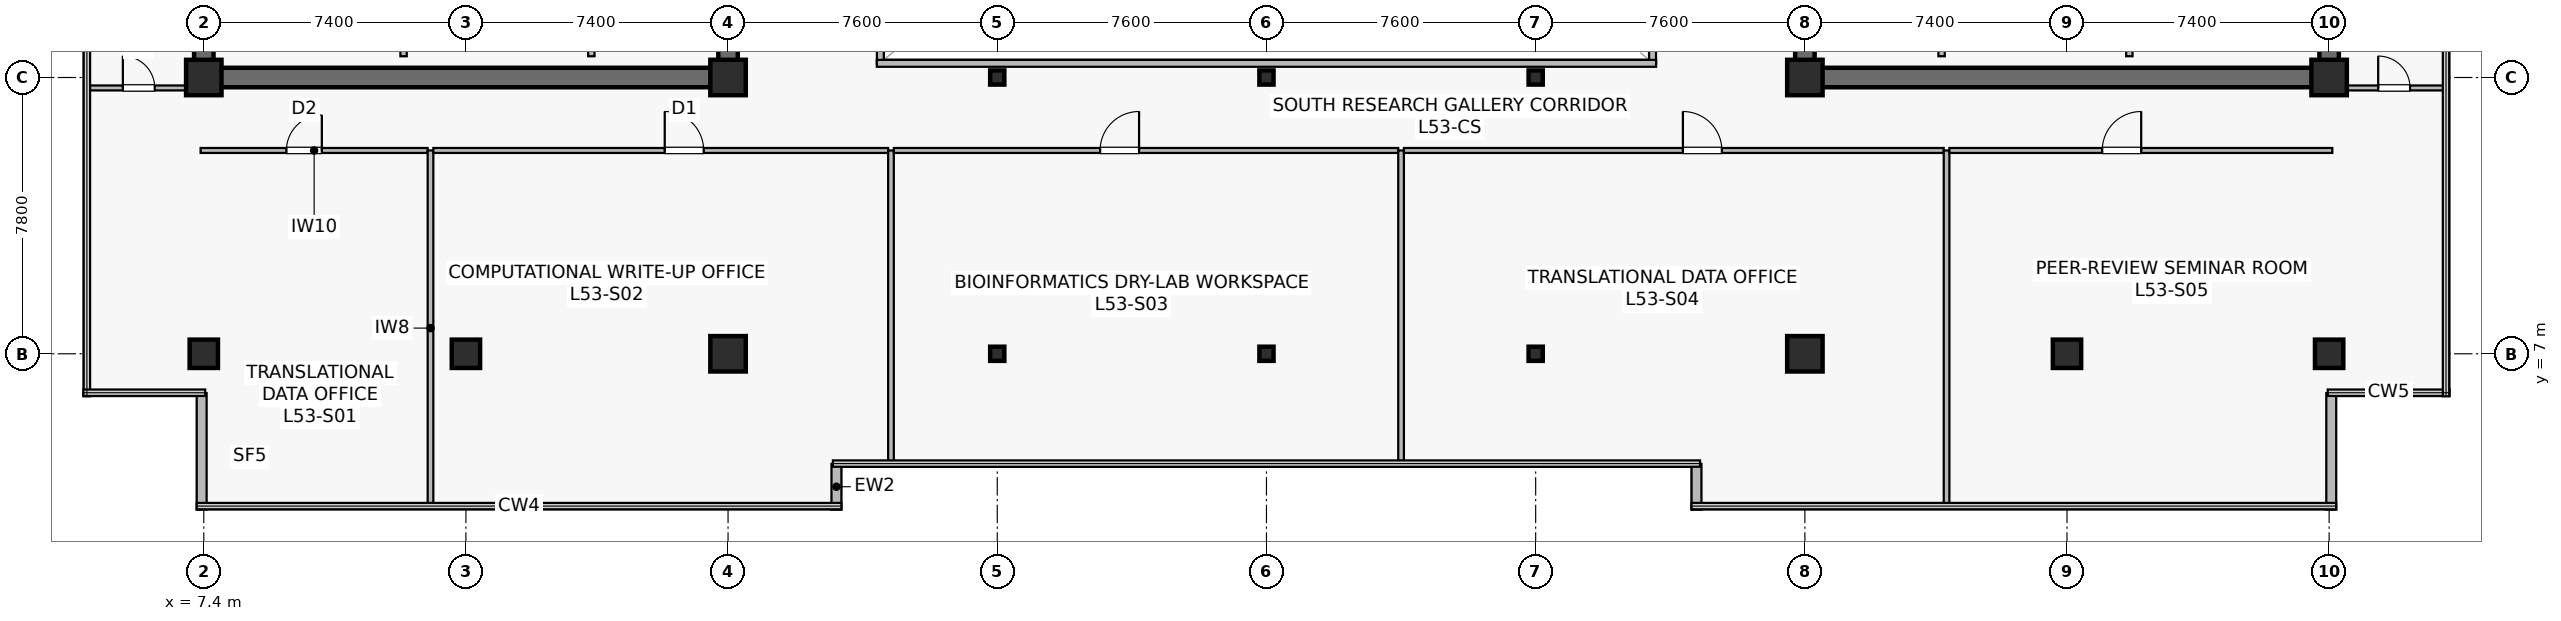
"""IFC4 building model, lengths in metres.
Left out: names, types, materials, properties, quantities, classifications, styles, units other than length and angle.
Written with IfcOpenShell. Run it as: python <this file> out.ifc"""

import sys

from ifc_helpers import new_model, si_unit, direction, frame, frame_2d, origin, origin_2d, place, context, subcontext, project, spatial, rectangle, hollow_rectangle, extrude, source, transform, mapped, element, fill, save


model = new_model("IFC4")
c1 = context("Model", 3, precision=1e-05, world=origin(), true_north=direction((0.0, 1.0)))
c2 = subcontext(c1, "Body", "Model", "MODEL_VIEW")
j1 = project(units=[si_unit("LENGTHUNIT", "METRE"), si_unit("PLANEANGLEUNIT", "RADIAN")], contexts=[c1])
p1 = place(None, origin())
s1 = spatial("IfcSite", under=j1, at=p1, CompositionType="ELEMENT")
p2 = place(p1, origin())
s2 = spatial("IfcBuilding", under=s1, at=p2, CompositionType="ELEMENT")
p3 = place(p2, frame((0.0, 0.0, 221.9)))
s3 = spatial("IfcBuildingStorey", under=s2, at=p3, CompositionType="ELEMENT", Elevation=221.9)
p4 = place(p3, frame((7.125, 14.8, 0.0), z_axis=(0.0, 0.0, 1.0), x_axis=(1.0, 0.0, 0.0)))
e1 = element("IfcWall", 1, at=p4, inside=s3, PredefinedType="SHEAR", context=c2, shape_type="SweptSolid", body=[
    extrude(rectangle(XDim=15.35, YDim=0.55, at=frame_2d((7.675, 0.0))), origin(), (0.0, 0.0, 1.0), 3.8),
])
p5 = place(p3, frame((7.4, 15.075, 0.0), z_axis=(0.0, 0.0, 1.0), x_axis=(0.0, 1.0, 0.0)))
e2 = element("IfcWall", 2, at=p5, inside=s3, PredefinedType="SHEAR", context=c2, shape_type="SweptSolid", body=[
    extrude(rectangle(XDim=18.45, YDim=0.55, at=frame_2d((9.225, 0.0))), origin(), (0.0, 0.0, 1.0), 3.8),
])
p6 = place(p3, frame((22.2, 15.075, 0.0), z_axis=(0.0, 0.0, 1.0), x_axis=(0.0, 1.0, 0.0)))
e3 = element("IfcWall", 3, at=p6, inside=s3, PredefinedType="SHEAR", context=c2, shape_type="SweptSolid", body=[
    extrude(rectangle(XDim=18.45, YDim=0.55, at=frame_2d((9.225, 0.0))), origin(), (0.0, 0.0, 1.0), 3.8),
])
p7 = place(p6, frame((3.475, 0.0, 0.0)))
e4 = element("IfcOpeningElement", 4, at=p7, cuts=e3, PredefinedType="OPENING", context=c2, shape_type="SweptSolid", body=[
    extrude(rectangle(XDim=1.42, YDim=2.2, at=frame_2d((0.71, 1.1))), frame((0.0, 0.285, 0.0), z_axis=(0.0, -1.0, 0.0), x_axis=(1.0, 0.0, 0.0)), (0.0, 0.0, 1.0), 0.57),
])
p8 = place(p3, frame((52.325, 14.8, 0.0), z_axis=(0.0, 0.0, 1.0), x_axis=(1.0, 0.0, 0.0)))
e5 = element("IfcWall", 5, at=p8, inside=s3, PredefinedType="SHEAR", context=c2, shape_type="SweptSolid", body=[
    extrude(rectangle(XDim=15.35, YDim=0.55, at=frame_2d((7.675, 0.0))), origin(), (0.0, 0.0, 1.0), 3.8),
])
p9 = place(p3, frame((52.6, 15.075, 0.0), z_axis=(0.0, 0.0, 1.0), x_axis=(0.0, 1.0, 0.0)))
e6 = element("IfcWall", 6, at=p9, inside=s3, PredefinedType="SHEAR", context=c2, shape_type="SweptSolid", body=[
    extrude(rectangle(XDim=18.45, YDim=0.55, at=frame_2d((9.225, 0.0))), origin(), (0.0, 0.0, 1.0), 3.8),
])
p10 = place(p9, frame((3.475, 0.0, 0.0)))
e7 = element("IfcOpeningElement", 7, at=p10, cuts=e6, PredefinedType="OPENING", context=c2, shape_type="SweptSolid", body=[
    extrude(rectangle(XDim=1.42, YDim=2.2, at=frame_2d((0.71, 1.1))), frame((0.0, 0.285, 0.0), z_axis=(0.0, -1.0, 0.0), x_axis=(1.0, 0.0, 0.0)), (0.0, 0.0, 1.0), 0.57),
])
p11 = place(p3, frame((67.4, 15.075, 0.0), z_axis=(0.0, 0.0, 1.0), x_axis=(0.0, 1.0, 0.0)))
e8 = element("IfcWall", 8, at=p11, inside=s3, PredefinedType="SHEAR", context=c2, shape_type="SweptSolid", body=[
    extrude(rectangle(XDim=18.45, YDim=0.55, at=frame_2d((9.225, 0.0))), origin(), (0.0, 0.0, 1.0), 3.8),
])
m1 = source(origin(), c2, "Body", "SweptSolid", [
    extrude(rectangle(XDim=0.8, YDim=0.8, at=origin_2d()), origin(), (0.0, 0.0, 1.0), 4.1),
])
p12 = place(p3, frame((14.8, 7.0, 0.0), z_axis=(0.0, 0.0, 1.0), x_axis=(1.0, 0.0, 0.0)))
e9 = element("IfcColumn", 9, at=p12, inside=s3, PredefinedType="COLUMN", context=c2, shape_type="MappedRepresentation", body=[
    mapped(m1, transform((0.0, 0.0, 0.0), scale=1.0)),
])
m2 = source(origin(), c2, "Body", "SweptSolid", [
    extrude(rectangle(XDim=1.0, YDim=1.0, at=origin_2d()), origin(), (0.0, 0.0, 1.0), 4.1),
])
for number, where, z_axis, x_axis in (
    (10, (22.2, 7.0, 0.0), (0.0, 0.0, 1.0), (1.0, 0.0, 0.0)),
    (11, (7.4, 14.8, 0.0), (0.0, 0.0, 1.0), (1.0, 0.0, 0.0)),
    (12, (22.2, 14.8, 0.0), (0.0, 0.0, 1.0), (1.0, 0.0, 0.0)),
    (13, (52.6, 7.0, 0.0), (0.0, 0.0, 1.0), (1.0, 0.0, 0.0)),
):
    element("IfcColumn", number, at=place(p3, frame(where, z_axis=z_axis, x_axis=x_axis)), inside=s3, PredefinedType="COLUMN", context=c2, shape_type="MappedRepresentation", body=[
        mapped(m2, transform((0.0, 0.0, 0.0), scale=1.0)),
    ])
p13 = place(p3, frame((60.0, 7.0, 0.0), z_axis=(0.0, 0.0, 1.0), x_axis=(1.0, 0.0, 0.0)))
e14 = element("IfcColumn", 14, at=p13, inside=s3, PredefinedType="COLUMN", context=c2, shape_type="MappedRepresentation", body=[
    mapped(m1, transform((0.0, 0.0, 0.0), scale=1.0)),
])
for number, where, z_axis, x_axis in (
    (15, (52.6, 14.8, 0.0), (0.0, 0.0, 1.0), (1.0, 0.0, 0.0)),
    (16, (67.4, 14.8, 0.0), (0.0, 0.0, 1.0), (1.0, 0.0, 0.0)),
):
    element("IfcColumn", number, at=place(p3, frame(where, z_axis=z_axis, x_axis=x_axis)), inside=s3, PredefinedType="COLUMN", context=c2, shape_type="MappedRepresentation", body=[
        mapped(m2, transform((0.0, 0.0, 0.0), scale=1.0)),
    ])
for number, where, z_axis, x_axis in (
    (17, (7.4, 7.0, 0.0), (0.0, 0.0, 1.0), (1.0, 0.0, 0.0)),
    (18, (67.4, 7.0, 0.0), (0.0, 0.0, 1.0), (1.0, 0.0, 0.0)),
):
    element("IfcColumn", number, at=place(p3, frame(where, z_axis=z_axis, x_axis=x_axis)), inside=s3, PredefinedType="COLUMN", context=c2, shape_type="MappedRepresentation", body=[
        mapped(m1, transform((0.0, 0.0, 0.0), scale=1.0)),
    ])
m3 = source(origin(), c2, "Body", "SweptSolid", [
    extrude(hollow_rectangle(XDim=0.4, YDim=0.4, WallThickness=0.019, at=origin_2d()), origin(), (0.0, 0.0, 1.0), 4.1),
])
for number, where, z_axis, x_axis in (
    (19, (29.8, 7.0, 0.0), (0.0, 0.0, 1.0), (1.0, 0.0, 0.0)),
    (20, (29.8, 14.8, 0.0), (0.0, 0.0, 1.0), (1.0, 0.0, 0.0)),
    (21, (37.4, 7.0, 0.0), (0.0, 0.0, 1.0), (1.0, 0.0, 0.0)),
    (22, (37.4, 14.8, 0.0), (0.0, 0.0, 1.0), (1.0, 0.0, 0.0)),
    (23, (45.0, 7.0, 0.0), (0.0, 0.0, 1.0), (1.0, 0.0, 0.0)),
    (24, (45.0, 14.8, 0.0), (0.0, 0.0, 1.0), (1.0, 0.0, 0.0)),
):
    element("IfcColumn", number, at=place(p3, frame(where, z_axis=z_axis, x_axis=x_axis)), inside=s3, PredefinedType="COLUMN", context=c2, shape_type="MappedRepresentation", body=[
        mapped(m3, transform((0.0, 0.0, 0.0), scale=1.0)),
    ])
for number, where, z_axis, x_axis in (
    (25, (25.26, 2.6, 0.0), (0.0, 0.0, 1.0), (0.0, 1.0, 0.0)),
    (26, (49.54, 3.893, 0.0), (0.0, 0.0, 1.0), (0.0, -1.0, 0.0)),
):
    element("IfcWall", number, at=place(p3, frame(where, z_axis=z_axis, x_axis=x_axis)), inside=s3, PredefinedType="STANDARD", context=c2, shape_type="SweptSolid", body=[
        extrude(rectangle(XDim=1.293, YDim=0.28, at=frame_2d((0.646, 0.0))), origin(), (0.0, 0.0, 1.0), 3.8),
    ])
for number, where, z_axis, x_axis in (
    (27, (67.46, 2.6, 0.0), (0.0, 0.0, 1.0), (0.0, 1.0, 0.0)),
    (28, (7.34, 5.888, 0.0), (0.0, 0.0, 1.0), (0.0, -1.0, 0.0)),
):
    element("IfcWall", number, at=place(p3, frame(where, z_axis=z_axis, x_axis=x_axis)), inside=s3, PredefinedType="STANDARD", context=c2, shape_type="SweptSolid", body=[
        extrude(rectangle(XDim=3.288, YDim=0.28, at=frame_2d((1.644, 0.0))), origin(), (0.0, 0.0, 1.0), 3.8),
    ])
for number, where, z_axis, x_axis in (
    (29, (13.04, 15.4, 0.0), (0.0, 0.0, 1.0), (0.0, 1.0, 0.0)),
    (30, (18.34, 15.4, 0.0), (0.0, 0.0, 1.0), (0.0, 1.0, 0.0)),
    (31, (61.76, 15.4, 0.0), (0.0, 0.0, 1.0), (0.0, 1.0, 0.0)),
    (32, (56.46, 15.4, 0.0), (0.0, 0.0, 1.0), (0.0, 1.0, 0.0)),
):
    element("IfcWall", number, at=place(p3, frame(where, z_axis=z_axis, x_axis=x_axis)), inside=s3, PredefinedType="SOLIDWALL", context=c2, shape_type="SweptSolid", body=[
        extrude(rectangle(XDim=2.4, YDim=0.18, at=frame_2d((1.2, 0.0))), origin(), (0.0, 0.0, 1.0), 3.8),
    ])
p14 = place(p3, frame((26.5, 15.2, 0.0), z_axis=(0.0, 0.0, 1.0), x_axis=(0.0, 1.0, 0.0)))
e33 = element("IfcWall", 33, at=p14, inside=s3, PredefinedType="SOLIDWALL", context=c2, shape_type="SweptSolid", body=[
    extrude(rectangle(XDim=18.2, YDim=0.195, at=frame_2d((9.1, 0.0))), origin(), (0.0, 0.0, 1.0), 3.8),
])
p15 = place(p14, frame((1.8, 0.0, 0.9)))
e34 = element("IfcOpeningElement", 34, at=p15, cuts=e33, PredefinedType="OPENING", context=c2, shape_type="SweptSolid", body=[
    extrude(rectangle(XDim=1.2, YDim=1.35, at=frame_2d((0.6, 0.675))), frame((0.0, 0.107, 0.0), z_axis=(0.0, -1.0, 0.0), x_axis=(1.0, 0.0, 0.0)), (0.0, 0.0, 1.0), 0.215),
])
p16 = place(p14, frame((13.2, 0.0, 0.9)))
e35 = element("IfcOpeningElement", 35, at=p16, cuts=e33, PredefinedType="OPENING", context=c2, shape_type="SweptSolid", body=[
    extrude(rectangle(XDim=1.2, YDim=1.35, at=frame_2d((0.6, 0.675))), frame((0.0, 0.107, 0.0), z_axis=(0.0, -1.0, 0.0), x_axis=(1.0, 0.0, 0.0)), (0.0, 0.0, 1.0), 0.215),
])
p17 = place(p3, frame((48.3, 15.2, 0.0), z_axis=(0.0, 0.0, 1.0), x_axis=(0.0, 1.0, 0.0)))
e36 = element("IfcWall", 36, at=p17, inside=s3, PredefinedType="SOLIDWALL", context=c2, shape_type="SweptSolid", body=[
    extrude(rectangle(XDim=18.2, YDim=0.195, at=frame_2d((9.1, 0.0))), origin(), (0.0, 0.0, 1.0), 3.8),
])
p18 = place(p17, frame((1.8, 0.0, 0.9)))
e37 = element("IfcOpeningElement", 37, at=p18, cuts=e36, PredefinedType="OPENING", context=c2, shape_type="SweptSolid", body=[
    extrude(rectangle(XDim=1.2, YDim=1.35, at=frame_2d((0.6, 0.675))), frame((0.0, 0.107, 0.0), z_axis=(0.0, -1.0, 0.0), x_axis=(1.0, 0.0, 0.0)), (0.0, 0.0, 1.0), 0.215),
])
p19 = place(p17, frame((13.2, 0.0, 0.9)))
e38 = element("IfcOpeningElement", 38, at=p19, cuts=e36, PredefinedType="OPENING", context=c2, shape_type="SweptSolid", body=[
    extrude(rectangle(XDim=1.2, YDim=1.35, at=frame_2d((0.6, 0.675))), frame((0.0, 0.107, 0.0), z_axis=(0.0, -1.0, 0.0), x_axis=(1.0, 0.0, 0.0)), (0.0, 0.0, 1.0), 0.215),
])
p20 = place(p3, frame((26.4, 15.2, 0.0), z_axis=(0.0, 0.0, 1.0), x_axis=(1.0, 0.0, 0.0)))
e39 = element("IfcWall", 39, at=p20, inside=s3, PredefinedType="SOLIDWALL", context=c2, shape_type="SweptSolid", body=[
    extrude(rectangle(XDim=22.0, YDim=0.195, at=frame_2d((11.0, 0.0))), origin(), (0.0, 0.0, 1.0), 3.8),
])
p21 = place(p3, frame((7.31, 12.74, 0.0), z_axis=(0.0, 0.0, 1.0), x_axis=(1.0, 0.0, 0.0)))
e40 = element("IfcWall", 40, at=p21, inside=s3, PredefinedType="PARTITIONING", context=c2, shape_type="SweptSolid", body=[
    extrude(rectangle(XDim=6.41, YDim=0.14, at=frame_2d((3.205, 0.0))), origin(), (0.0, 0.0, 1.0), 3.335),
])
p22 = place(p21, frame((2.422, 0.0, 0.0)))
e41 = element("IfcOpeningElement", 41, at=p22, cuts=e40, PredefinedType="OPENING", context=c2, shape_type="SweptSolid", body=[
    extrude(rectangle(XDim=1.0, YDim=2.15, at=frame_2d((0.5, 1.075))), frame((0.0, 0.08, 0.0), z_axis=(0.0, -1.0, 0.0), x_axis=(1.0, 0.0, 0.0)), (0.0, 0.0, 1.0), 0.16),
])
p23 = place(p3, frame((13.8, 2.71, 0.0), z_axis=(0.0, 0.0, 1.0), x_axis=(0.0, 1.0, 0.0)))
e42 = element("IfcWall", 42, at=p23, inside=s3, PredefinedType="PARTITIONING", context=c2, shape_type="SweptSolid", body=[
    extrude(rectangle(XDim=10.03, YDim=0.16, at=frame_2d((5.015, 0.0))), origin(), (0.0, 0.0, 1.0), 3.135),
])
p24 = place(p3, frame((13.88, 12.74, 0.0), z_axis=(0.0, 0.0, 1.0), x_axis=(1.0, 0.0, 0.0)))
e43 = element("IfcWall", 43, at=p24, inside=s3, PredefinedType="PARTITIONING", context=c2, shape_type="SweptSolid", body=[
    extrude(rectangle(XDim=12.84, YDim=0.14, at=frame_2d((6.42, 0.0))), origin(), (0.0, 0.0, 1.0), 3.197),
])
p25 = place(p24, frame((6.532, 0.0, 0.0)))
e44 = element("IfcOpeningElement", 44, at=p25, cuts=e43, PredefinedType="OPENING", context=c2, shape_type="SweptSolid", body=[
    extrude(rectangle(XDim=1.1, YDim=2.18, at=frame_2d((0.55, 1.09))), frame((0.0, 0.08, 0.0), z_axis=(0.0, -1.0, 0.0), x_axis=(1.0, 0.0, 0.0)), (0.0, 0.0, 1.0), 0.16),
])
p26 = place(p3, frame((26.8, 3.91, 0.0), z_axis=(0.0, 0.0, 1.0), x_axis=(0.0, 1.0, 0.0)))
e45 = element("IfcWall", 45, at=p26, inside=s3, PredefinedType="PARTITIONING", context=c2, shape_type="SweptSolid", body=[
    extrude(rectangle(XDim=8.83, YDim=0.16, at=frame_2d((4.415, 0.0))), origin(), (0.0, 0.0, 1.0), 3.135),
])
p27 = place(p3, frame((26.88, 12.74, 0.0), z_axis=(0.0, 0.0, 1.0), x_axis=(1.0, 0.0, 0.0)))
e46 = element("IfcWall", 46, at=p27, inside=s3, PredefinedType="PARTITIONING", context=c2, shape_type="SweptSolid", body=[
    extrude(rectangle(XDim=14.24, YDim=0.14, at=frame_2d((7.12, 0.0))), origin(), (0.0, 0.0, 1.0), 3.197),
])
p28 = place(p27, frame((5.823, 0.0, 0.0)))
e47 = element("IfcOpeningElement", 47, at=p28, cuts=e46, PredefinedType="OPENING", context=c2, shape_type="SweptSolid", body=[
    extrude(rectangle(XDim=1.1, YDim=2.18, at=frame_2d((0.55, 1.09))), frame((0.0, 0.08, 0.0), z_axis=(0.0, -1.0, 0.0), x_axis=(1.0, 0.0, 0.0)), (0.0, 0.0, 1.0), 0.16),
])
p29 = place(p3, frame((41.2, 3.91, 0.0), z_axis=(0.0, 0.0, 1.0), x_axis=(0.0, 1.0, 0.0)))
e48 = element("IfcWall", 48, at=p29, inside=s3, PredefinedType="PARTITIONING", context=c2, shape_type="SweptSolid", body=[
    extrude(rectangle(XDim=8.83, YDim=0.16, at=frame_2d((4.415, 0.0))), origin(), (0.0, 0.0, 1.0), 3.135),
])
p30 = place(p3, frame((41.28, 12.74, 0.0), z_axis=(0.0, 0.0, 1.0), x_axis=(1.0, 0.0, 0.0)))
e49 = element("IfcWall", 49, at=p30, inside=s3, PredefinedType="PARTITIONING", context=c2, shape_type="SweptSolid", body=[
    extrude(rectangle(XDim=15.24, YDim=0.14, at=frame_2d((7.62, 0.0))), origin(), (0.0, 0.0, 1.0), 3.197),
])
p31 = place(p30, frame((7.876, 0.0, 0.0)))
e50 = element("IfcOpeningElement", 50, at=p31, cuts=e49, PredefinedType="OPENING", context=c2, shape_type="SweptSolid", body=[
    extrude(rectangle(XDim=1.1, YDim=2.18, at=frame_2d((0.55, 1.09))), frame((0.0, 0.08, 0.0), z_axis=(0.0, -1.0, 0.0), x_axis=(1.0, 0.0, 0.0)), (0.0, 0.0, 1.0), 0.16),
])
p32 = place(p3, frame((56.6, 2.71, 0.0), z_axis=(0.0, 0.0, 1.0), x_axis=(0.0, 1.0, 0.0)))
e51 = element("IfcWall", 51, at=p32, inside=s3, PredefinedType="PARTITIONING", context=c2, shape_type="SweptSolid", body=[
    extrude(rectangle(XDim=10.03, YDim=0.16, at=frame_2d((5.015, 0.0))), origin(), (0.0, 0.0, 1.0), 3.135),
])
p33 = place(p3, frame((56.68, 12.74, 0.0), z_axis=(0.0, 0.0, 1.0), x_axis=(1.0, 0.0, 0.0)))
e52 = element("IfcWall", 52, at=p33, inside=s3, PredefinedType="PARTITIONING", context=c2, shape_type="SweptSolid", body=[
    extrude(rectangle(XDim=10.81, YDim=0.14, at=frame_2d((5.405, 0.0))), origin(), (0.0, 0.0, 1.0), 3.197),
])
p34 = place(p33, frame((4.314, 0.0, 0.0)))
e53 = element("IfcOpeningElement", 53, at=p34, cuts=e52, PredefinedType="OPENING", context=c2, shape_type="SweptSolid", body=[
    extrude(rectangle(XDim=1.1, YDim=2.18, at=frame_2d((0.55, 1.09))), frame((0.0, 0.08, 0.0), z_axis=(0.0, -1.0, 0.0), x_axis=(1.0, 0.0, 0.0)), (0.0, 0.0, 1.0), 0.16),
])
p35 = place(p3, frame((4.11, 14.505, 0.0), z_axis=(0.0, 0.0, 1.0), x_axis=(1.0, 0.0, 0.0)))
e54 = element("IfcWall", 54, at=p35, inside=s3, PredefinedType="PARTITIONING", context=c2, shape_type="SweptSolid", body=[
    extrude(rectangle(XDim=2.91, YDim=0.14, at=frame_2d((1.455, 0.0))), origin(), (0.0, 0.0, 1.0), 3.8),
])
p36 = place(p35, frame((1.005, 0.0, 0.0)))
e55 = element("IfcOpeningElement", 55, at=p36, cuts=e54, PredefinedType="OPENING", context=c2, shape_type="SweptSolid", body=[
    extrude(rectangle(XDim=0.9, YDim=2.1, at=frame_2d((0.45, 1.05))), frame((0.0, 0.08, 0.0), z_axis=(0.0, -1.0, 0.0), x_axis=(1.0, 0.0, 0.0)), (0.0, 0.0, 1.0), 0.16),
])
p37 = place(p3, frame((67.78, 14.505, 0.0), z_axis=(0.0, 0.0, 1.0), x_axis=(1.0, 0.0, 0.0)))
e56 = element("IfcWall", 56, at=p37, inside=s3, PredefinedType="PARTITIONING", context=c2, shape_type="SweptSolid", body=[
    extrude(rectangle(XDim=2.91, YDim=0.14, at=frame_2d((1.455, 0.0))), origin(), (0.0, 0.0, 1.0), 3.8),
])
p38 = place(p37, frame((1.005, 0.0, 0.0)))
e57 = element("IfcOpeningElement", 57, at=p38, cuts=e56, PredefinedType="OPENING", context=c2, shape_type="SweptSolid", body=[
    extrude(rectangle(XDim=0.9, YDim=2.1, at=frame_2d((0.45, 1.05))), frame((0.0, 0.08, 0.0), z_axis=(0.0, -1.0, 0.0), x_axis=(1.0, 0.0, 0.0)), (0.0, 0.0, 1.0), 0.16),
])
m4 = source(origin(), c2, "Body", "SweptSolid", [
    extrude(rectangle(XDim=1.0, YDim=2.15, at=frame_2d((0.5, 1.075))), frame((0.0, 0.025, 0.0), z_axis=(0.0, -1.0, 0.0), x_axis=(1.0, 0.0, 0.0)), (0.0, 0.0, 1.0), 0.05),
])
p39 = place(p22, origin())
e58 = element("IfcDoor", 58, at=p39, inside=s3, OperationType="SINGLE_SWING_RIGHT", PredefinedType="DOOR", context=c2, shape_type="MappedRepresentation", body=[
    mapped(m4, transform((0.0, 0.0, 0.0), scale=1.0)),
])
fill(e41, e58)
m5 = source(origin(), c2, "Body", "SweptSolid", [
    extrude(rectangle(XDim=1.1, YDim=2.18, at=frame_2d((0.55, 1.09))), frame((0.0, 0.025, 0.0), z_axis=(0.0, -1.0, 0.0), x_axis=(1.0, 0.0, 0.0)), (0.0, 0.0, 1.0), 0.05),
])
p40 = place(p25, origin())
e59 = element("IfcDoor", 59, at=p40, inside=s3, OperationType="SINGLE_SWING_LEFT", PredefinedType="DOOR", context=c2, shape_type="MappedRepresentation", body=[
    mapped(m5, transform((0.0, 0.0, 0.0), scale=1.0)),
])
fill(e44, e59)
p41 = place(p28, origin())
e60 = element("IfcDoor", 60, at=p41, inside=s3, OperationType="SINGLE_SWING_RIGHT", PredefinedType="DOOR", context=c2, shape_type="MappedRepresentation", body=[
    mapped(m5, transform((0.0, 0.0, 0.0), scale=1.0)),
])
fill(e47, e60)
p42 = place(p31, origin())
e61 = element("IfcDoor", 61, at=p42, inside=s3, OperationType="SINGLE_SWING_LEFT", PredefinedType="DOOR", context=c2, shape_type="MappedRepresentation", body=[
    mapped(m5, transform((0.0, 0.0, 0.0), scale=1.0)),
])
fill(e50, e61)
p43 = place(p34, origin())
e62 = element("IfcDoor", 62, at=p43, inside=s3, OperationType="SINGLE_SWING_RIGHT", PredefinedType="DOOR", context=c2, shape_type="MappedRepresentation", body=[
    mapped(m5, transform((0.0, 0.0, 0.0), scale=1.0)),
])
fill(e53, e62)
m6 = source(origin(), c2, "Body", "SweptSolid", [
    extrude(rectangle(XDim=0.9, YDim=2.1, at=frame_2d((0.45, 1.05))), frame((0.0, 0.025, 0.0), z_axis=(0.0, -1.0, 0.0), x_axis=(1.0, 0.0, 0.0)), (0.0, 0.0, 1.0), 0.05),
])
p44 = place(p36, origin())
e63 = element("IfcDoor", 63, at=p44, inside=s3, OperationType="SINGLE_SWING_LEFT", PredefinedType="DOOR", context=c2, shape_type="MappedRepresentation", body=[
    mapped(m6, transform((0.0, 0.0, 0.0), scale=1.0)),
])
fill(e55, e63)
p45 = place(p38, origin())
e64 = element("IfcDoor", 64, at=p45, inside=s3, OperationType="SINGLE_SWING_LEFT", PredefinedType="DOOR", context=c2, shape_type="MappedRepresentation", body=[
    mapped(m6, transform((0.0, 0.0, 0.0), scale=1.0)),
])
fill(e57, e64)
save(model, sys.argv[1])
